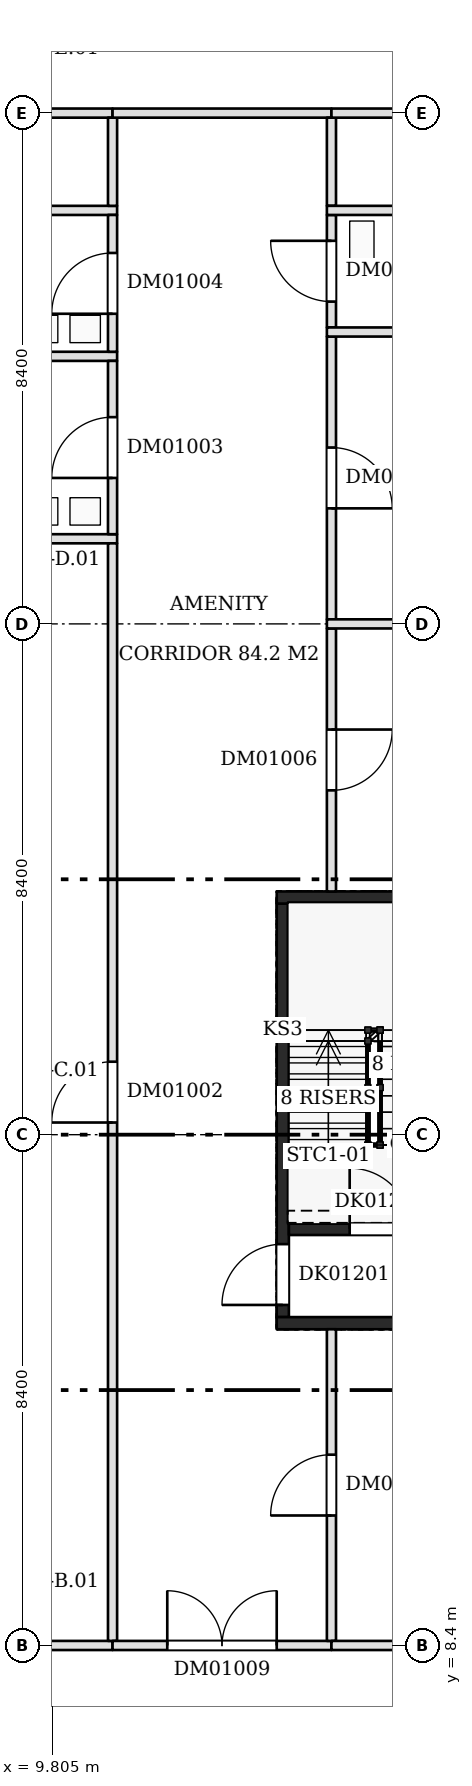
"""IFC4 building model, lengths in metres.
Left out: names, types, materials, properties, quantities, classifications, styles, units other than length and angle.
Written with IfcOpenShell. Run it as: python <this file> out.ifc"""

import sys

from ifc_helpers import new_model, si_unit, direction, frame, frame_2d, origin, place, context, subcontext, project, spatial, rectangle, extrude, element, fill, save


model = new_model("IFC4")
c1 = context("Model", 3, precision=1e-05, world=origin(), true_north=direction((0.0, 1.0)))
c2 = subcontext(c1, "Body", "Model", "MODEL_VIEW")
j1 = project(units=[si_unit("LENGTHUNIT", "METRE"), si_unit("PLANEANGLEUNIT", "RADIAN")], contexts=[c1])
p1 = place(None, origin())
s1 = spatial("IfcSite", under=j1, at=p1, CompositionType="ELEMENT")
p2 = place(p1, origin())
s2 = spatial("IfcBuilding", under=s1, at=p2, CompositionType="ELEMENT")
p3 = place(p2, frame((0.0, 0.0, 9.0)))
s3 = spatial("IfcBuildingStorey", under=s2, at=p3, CompositionType="ELEMENT", Elevation=9.0)
p4 = place(p3, frame((13.6, 13.8, 0.0), z_axis=(0.0, 0.0, 1.0), x_axis=(0.0, 1.0, 0.0)))
e1 = element("IfcWall", 1, at=p4, inside=s3, PredefinedType="SHEAR", context=c2, shape_type="SweptSolid", body=[
    extrude(rectangle(XDim=6.8, YDim=0.2, at=frame_2d((3.4, 0.0))), origin(), (0.0, 0.0, 1.0), 4.98),
])
p5 = place(p4, frame((0.2, 0.0, 0.0)))
e2 = element("IfcOpeningElement", 2, at=p5, cuts=e1, PredefinedType="OPENING", context=c2, shape_type="SweptSolid", body=[
    extrude(rectangle(XDim=1.0, YDim=2.1, at=frame_2d((0.5, 1.05))), frame((0.0, 0.11, 0.0), z_axis=(0.0, -1.0, 0.0), x_axis=(1.0, 0.0, 0.0)), (0.0, 0.0, 1.0), 0.22),
])
for number, where, z_axis, x_axis in (
    (3, (13.5, 13.7, 0.0), (0.0, 0.0, 1.0), (1.0, 0.0, 0.0)),
    (4, (13.5, 20.7, 0.0), (0.0, 0.0, 1.0), (1.0, 0.0, 0.0)),
):
    element("IfcWall", number, at=place(p3, frame(where, z_axis=z_axis, x_axis=x_axis)), inside=s3, PredefinedType="SHEAR", context=c2, shape_type="SweptSolid", body=[
        extrude(rectangle(XDim=3.4, YDim=0.2, at=frame_2d((1.7, 0.0))), origin(), (0.0, 0.0, 1.0), 4.98),
    ])
p6 = place(p3, frame((13.7, 15.25, 0.0), z_axis=(0.0, 0.0, 1.0), x_axis=(1.0, 0.0, 0.0)))
e5 = element("IfcWall", 5, at=p6, inside=s3, PredefinedType="SHEAR", context=c2, shape_type="SweptSolid", body=[
    extrude(rectangle(XDim=3.0, YDim=0.2, at=frame_2d((1.5, 0.0))), origin(), (0.0, 0.0, 1.0), 4.98),
])
p7 = place(p6, frame((1.0, 0.0, 0.0)))
e6 = element("IfcOpeningElement", 6, at=p7, cuts=e5, PredefinedType="OPENING", context=c2, shape_type="SweptSolid", body=[
    extrude(rectangle(XDim=1.0, YDim=2.1, at=frame_2d((0.5, 1.05))), frame((0.0, 0.11, 0.0), z_axis=(0.0, -1.0, 0.0), x_axis=(1.0, 0.0, 0.0)), (0.0, 0.0, 1.0), 0.22),
])
for number, where, z_axis, x_axis in (
    (7, (2.5, 29.6, 0.0), (0.0, 0.0, 1.0), (1.0, 0.0, 0.0)),
    (8, (2.5, 32.0, 0.0), (0.0, 0.0, 1.0), (1.0, 0.0, 0.0)),
):
    element("IfcWall", number, at=place(p3, frame(where, z_axis=z_axis, x_axis=x_axis)), inside=s3, PredefinedType="PARTITIONING", context=c2, shape_type="SweptSolid", body=[
        extrude(rectangle(XDim=8.375, YDim=0.15, at=frame_2d((4.188, 0.0))), origin(), (0.0, 0.0, 1.0), 4.95),
    ])
p8 = place(p3, frame((9.15, 8.4, 0.0), z_axis=(0.0, 0.0, 1.0), x_axis=(1.0, 0.0, 0.0)))
e9 = element("IfcWall", 9, at=p8, inside=s3, PredefinedType="PARTITIONING", context=c2, shape_type="SweptSolid", body=[
    extrude(rectangle(XDim=1.65, YDim=0.15, at=frame_2d((0.825, 0.0))), origin(), (0.0, 0.0, 1.0), 4.95),
])
p9 = place(p3, frame((8.4, 26.6, 0.0), z_axis=(0.0, 0.0, 1.0), x_axis=(1.0, 0.0, 0.0)))
e10 = element("IfcWall", 10, at=p9, inside=s3, PredefinedType="PARTITIONING", context=c2, shape_type="SweptSolid", body=[
    extrude(rectangle(XDim=2.475, YDim=0.15, at=frame_2d((1.238, 0.0))), origin(), (0.0, 0.0, 1.0), 4.95),
])
p10 = place(p3, frame((9.15, 33.6, 0.0), z_axis=(0.0, 0.0, 1.0), x_axis=(1.0, 0.0, 0.0)))
e11 = element("IfcWall", 11, at=p10, inside=s3, PredefinedType="PARTITIONING", context=c2, shape_type="SweptSolid", body=[
    extrude(rectangle(XDim=1.65, YDim=0.15, at=frame_2d((0.825, 0.0))), origin(), (0.0, 0.0, 1.0), 4.95),
])
p11 = place(p3, frame((10.8, 8.475, 0.0), z_axis=(0.0, 0.0, 1.0), x_axis=(0.0, 1.0, 0.0)))
e12 = element("IfcWall", 12, at=p11, inside=s3, PredefinedType="PARTITIONING", context=c2, shape_type="SweptSolid", body=[
    extrude(rectangle(XDim=18.05, YDim=0.15, at=frame_2d((9.025, 0.0))), origin(), (0.0, 0.0, 1.0), 4.95),
])
p12 = place(p11, frame((8.525, 0.0, 0.0)))
e13 = element("IfcOpeningElement", 13, at=p12, cuts=e12, PredefinedType="OPENING", context=c2, shape_type="SweptSolid", body=[
    extrude(rectangle(XDim=1.0, YDim=2.1, at=frame_2d((0.5, 1.05))), frame((0.0, 0.085, 0.0), z_axis=(0.0, -1.0, 0.0), x_axis=(1.0, 0.0, 0.0)), (0.0, 0.0, 1.0), 0.17),
])
p13 = place(p3, frame((10.8, 8.4, 0.0), z_axis=(0.0, 0.0, 1.0), x_axis=(1.0, 0.0, 0.0)))
e14 = element("IfcWall", 14, at=p13, inside=s3, PredefinedType="PARTITIONING", context=c2, shape_type="SweptSolid", body=[
    extrude(rectangle(XDim=3.6, YDim=0.15, at=frame_2d((1.8, 0.0))), origin(), (0.0, 0.0, 1.0), 4.95),
])
p14 = place(p13, frame((0.9, 0.0, 0.0)))
e15 = element("IfcOpeningElement", 15, at=p14, cuts=e14, PredefinedType="OPENING", context=c2, shape_type="SweptSolid", body=[
    extrude(rectangle(XDim=1.8, YDim=2.1, at=frame_2d((0.9, 1.05))), frame((0.0, 0.085, 0.0), z_axis=(0.0, -1.0, 0.0), x_axis=(1.0, 0.0, 0.0)), (0.0, 0.0, 1.0), 0.17),
])
p15 = place(p3, frame((10.8, 26.675, 0.0), z_axis=(0.0, 0.0, 1.0), x_axis=(0.0, 1.0, 0.0)))
e16 = element("IfcWall", 16, at=p15, inside=s3, PredefinedType="PARTITIONING", context=c2, shape_type="SweptSolid", body=[
    extrude(rectangle(XDim=2.85, YDim=0.15, at=frame_2d((1.425, 0.0))), origin(), (0.0, 0.0, 1.0), 4.95),
])
p16 = place(p15, frame((0.925, 0.0, 0.0)))
e17 = element("IfcOpeningElement", 17, at=p16, cuts=e16, PredefinedType="OPENING", context=c2, shape_type="SweptSolid", body=[
    extrude(rectangle(XDim=1.0, YDim=2.1, at=frame_2d((0.5, 1.05))), frame((0.0, 0.085, 0.0), z_axis=(0.0, -1.0, 0.0), x_axis=(1.0, 0.0, 0.0)), (0.0, 0.0, 1.0), 0.17),
])
p17 = place(p3, frame((10.8, 29.675, 0.0), z_axis=(0.0, 0.0, 1.0), x_axis=(0.0, 1.0, 0.0)))
e18 = element("IfcWall", 18, at=p17, inside=s3, PredefinedType="PARTITIONING", context=c2, shape_type="SweptSolid", body=[
    extrude(rectangle(XDim=2.25, YDim=0.15, at=frame_2d((1.125, 0.0))), origin(), (0.0, 0.0, 1.0), 4.95),
])
p18 = place(p17, frame((0.625, 0.0, 0.0)))
e19 = element("IfcOpeningElement", 19, at=p18, cuts=e18, PredefinedType="OPENING", context=c2, shape_type="SweptSolid", body=[
    extrude(rectangle(XDim=1.0, YDim=2.1, at=frame_2d((0.5, 1.05))), frame((0.0, 0.085, 0.0), z_axis=(0.0, -1.0, 0.0), x_axis=(1.0, 0.0, 0.0)), (0.0, 0.0, 1.0), 0.17),
])
p19 = place(p3, frame((10.8, 32.075, 0.0), z_axis=(0.0, 0.0, 1.0), x_axis=(0.0, 1.0, 0.0)))
e20 = element("IfcWall", 20, at=p19, inside=s3, PredefinedType="PARTITIONING", context=c2, shape_type="SweptSolid", body=[
    extrude(rectangle(XDim=1.45, YDim=0.15, at=frame_2d((0.725, 0.0))), origin(), (0.0, 0.0, 1.0), 4.95),
])
p20 = place(p3, frame((10.8, 33.6, 0.0), z_axis=(0.0, 0.0, 1.0), x_axis=(1.0, 0.0, 0.0)))
e21 = element("IfcWall", 21, at=p20, inside=s3, PredefinedType="PARTITIONING", context=c2, shape_type="SweptSolid", body=[
    extrude(rectangle(XDim=3.6, YDim=0.15, at=frame_2d((1.8, 0.0))), origin(), (0.0, 0.0, 1.0), 4.95),
])
p21 = place(p3, frame((14.4, 8.475, 0.0), z_axis=(0.0, 0.0, 1.0), x_axis=(0.0, 1.0, 0.0)))
e22 = element("IfcWall", 22, at=p21, inside=s3, PredefinedType="PARTITIONING", context=c2, shape_type="SweptSolid", body=[
    extrude(rectangle(XDim=5.125, YDim=0.15, at=frame_2d((2.562, 0.0))), origin(), (0.0, 0.0, 1.0), 4.95),
])
p22 = place(p21, frame((2.062, 0.0, 0.0)))
e23 = element("IfcOpeningElement", 23, at=p22, cuts=e22, PredefinedType="OPENING", context=c2, shape_type="SweptSolid", body=[
    extrude(rectangle(XDim=1.0, YDim=2.1, at=frame_2d((0.5, 1.05))), frame((0.0, 0.085, 0.0), z_axis=(0.0, -1.0, 0.0), x_axis=(1.0, 0.0, 0.0)), (0.0, 0.0, 1.0), 0.17),
])
p23 = place(p3, frame((14.4, 8.4, 0.0), z_axis=(0.0, 0.0, 1.0), x_axis=(1.0, 0.0, 0.0)))
e24 = element("IfcWall", 24, at=p23, inside=s3, PredefinedType="PARTITIONING", context=c2, shape_type="SweptSolid", body=[
    extrude(rectangle(XDim=1.65, YDim=0.15, at=frame_2d((0.825, 0.0))), origin(), (0.0, 0.0, 1.0), 4.95),
])
p24 = place(p3, frame((14.4, 20.8, 0.0), z_axis=(0.0, 0.0, 1.0), x_axis=(0.0, 1.0, 0.0)))
e25 = element("IfcWall", 25, at=p24, inside=s3, PredefinedType="PARTITIONING", context=c2, shape_type="SweptSolid", body=[
    extrude(rectangle(XDim=4.325, YDim=0.15, at=frame_2d((2.163, 0.0))), origin(), (0.0, 0.0, 1.0), 4.95),
])
p25 = place(p24, frame((1.663, 0.0, 0.0)))
e26 = element("IfcOpeningElement", 26, at=p25, cuts=e25, PredefinedType="OPENING", context=c2, shape_type="SweptSolid", body=[
    extrude(rectangle(XDim=1.0, YDim=2.1, at=frame_2d((0.5, 1.05))), frame((0.0, 0.085, 0.0), z_axis=(0.0, -1.0, 0.0), x_axis=(1.0, 0.0, 0.0)), (0.0, 0.0, 1.0), 0.17),
])
p26 = place(p3, frame((14.4, 25.275, 0.0), z_axis=(0.0, 0.0, 1.0), x_axis=(0.0, 1.0, 0.0)))
e27 = element("IfcWall", 27, at=p26, inside=s3, PredefinedType="PARTITIONING", context=c2, shape_type="SweptSolid", body=[
    extrude(rectangle(XDim=4.65, YDim=0.15, at=frame_2d((2.325, 0.0))), origin(), (0.0, 0.0, 1.0), 4.95),
])
p27 = place(p26, frame((1.825, 0.0, 0.0)))
e28 = element("IfcOpeningElement", 28, at=p27, cuts=e27, PredefinedType="OPENING", context=c2, shape_type="SweptSolid", body=[
    extrude(rectangle(XDim=1.0, YDim=2.1, at=frame_2d((0.5, 1.05))), frame((0.0, 0.085, 0.0), z_axis=(0.0, -1.0, 0.0), x_axis=(1.0, 0.0, 0.0)), (0.0, 0.0, 1.0), 0.17),
])
p28 = place(p3, frame((14.325, 25.2, 0.0), z_axis=(0.0, 0.0, 1.0), x_axis=(1.0, 0.0, 0.0)))
e29 = element("IfcWall", 29, at=p28, inside=s3, PredefinedType="PARTITIONING", context=c2, shape_type="SweptSolid", body=[
    extrude(rectangle(XDim=1.725, YDim=0.15, at=frame_2d((0.863, 0.0))), origin(), (0.0, 0.0, 1.0), 4.95),
])
p29 = place(p3, frame((14.4, 30.075, 0.0), z_axis=(0.0, 0.0, 1.0), x_axis=(0.0, 1.0, 0.0)))
e30 = element("IfcWall", 30, at=p29, inside=s3, PredefinedType="PARTITIONING", context=c2, shape_type="SweptSolid", body=[
    extrude(rectangle(XDim=1.85, YDim=0.15, at=frame_2d((0.925, 0.0))), origin(), (0.0, 0.0, 1.0), 4.95),
])
p30 = place(p29, frame((0.425, 0.0, 0.0)))
e31 = element("IfcOpeningElement", 31, at=p30, cuts=e30, PredefinedType="OPENING", context=c2, shape_type="SweptSolid", body=[
    extrude(rectangle(XDim=1.0, YDim=2.1, at=frame_2d((0.5, 1.05))), frame((0.0, 0.085, 0.0), z_axis=(0.0, -1.0, 0.0), x_axis=(1.0, 0.0, 0.0)), (0.0, 0.0, 1.0), 0.17),
])
p31 = place(p3, frame((14.325, 30.0, 0.0), z_axis=(0.0, 0.0, 1.0), x_axis=(1.0, 0.0, 0.0)))
e32 = element("IfcWall", 32, at=p31, inside=s3, PredefinedType="PARTITIONING", context=c2, shape_type="SweptSolid", body=[
    extrude(rectangle(XDim=3.75, YDim=0.15, at=frame_2d((1.875, 0.0))), origin(), (0.0, 0.0, 1.0), 4.95),
])
p32 = place(p3, frame((14.4, 32.075, 0.0), z_axis=(0.0, 0.0, 1.0), x_axis=(0.0, 1.0, 0.0)))
e33 = element("IfcWall", 33, at=p32, inside=s3, PredefinedType="PARTITIONING", context=c2, shape_type="SweptSolid", body=[
    extrude(rectangle(XDim=1.45, YDim=0.15, at=frame_2d((0.725, 0.0))), origin(), (0.0, 0.0, 1.0), 4.95),
])
p33 = place(p3, frame((14.325, 32.0, 0.0), z_axis=(0.0, 0.0, 1.0), x_axis=(1.0, 0.0, 0.0)))
e34 = element("IfcWall", 34, at=p33, inside=s3, PredefinedType="PARTITIONING", context=c2, shape_type="SweptSolid", body=[
    extrude(rectangle(XDim=3.75, YDim=0.15, at=frame_2d((1.875, 0.0))), origin(), (0.0, 0.0, 1.0), 4.95),
])
p34 = place(p3, frame((14.4, 33.6, 0.0), z_axis=(0.0, 0.0, 1.0), x_axis=(1.0, 0.0, 0.0)))
e35 = element("IfcWall", 35, at=p34, inside=s3, PredefinedType="PARTITIONING", context=c2, shape_type="SweptSolid", body=[
    extrude(rectangle(XDim=1.65, YDim=0.15, at=frame_2d((0.825, 0.0))), origin(), (0.0, 0.0, 1.0), 4.95),
])
p35 = place(p5, origin())
e36 = element("IfcDoor", 36, at=p35, inside=s3, OperationType="SINGLE_SWING_LEFT", PredefinedType="DOOR", context=c2, shape_type="SweptSolid", body=[
    extrude(rectangle(XDim=1.0, YDim=2.1, at=frame_2d((0.5, 1.05))), frame((0.0, 0.025, 0.0), z_axis=(0.0, -1.0, 0.0), x_axis=(1.0, 0.0, 0.0)), (0.0, 0.0, 1.0), 0.05),
])
fill(e2, e36)
p36 = place(p7, origin())
e37 = element("IfcDoor", 37, at=p36, inside=s3, OperationType="SINGLE_SWING_LEFT", PredefinedType="DOOR", context=c2, shape_type="SweptSolid", body=[
    extrude(rectangle(XDim=1.0, YDim=2.1, at=frame_2d((0.5, 1.05))), frame((0.0, 0.025, 0.0), z_axis=(0.0, -1.0, 0.0), x_axis=(1.0, 0.0, 0.0)), (0.0, 0.0, 1.0), 0.05),
])
fill(e6, e37)
p37 = place(p12, origin())
e38 = element("IfcDoor", 38, at=p37, inside=s3, OperationType="SINGLE_SWING_LEFT", PredefinedType="DOOR", context=c2, shape_type="SweptSolid", body=[
    extrude(rectangle(XDim=1.0, YDim=2.1, at=frame_2d((0.5, 1.05))), frame((0.0, 0.025, 0.0), z_axis=(0.0, -1.0, 0.0), x_axis=(1.0, 0.0, 0.0)), (0.0, 0.0, 1.0), 0.05),
])
fill(e13, e38)
p38 = place(p16, origin())
e39 = element("IfcDoor", 39, at=p38, inside=s3, OperationType="SINGLE_SWING_LEFT", PredefinedType="DOOR", context=c2, shape_type="SweptSolid", body=[
    extrude(rectangle(XDim=1.0, YDim=2.1, at=frame_2d((0.5, 1.05))), frame((0.0, 0.025, 0.0), z_axis=(0.0, -1.0, 0.0), x_axis=(1.0, 0.0, 0.0)), (0.0, 0.0, 1.0), 0.05),
])
fill(e17, e39)
p39 = place(p18, origin())
e40 = element("IfcDoor", 40, at=p39, inside=s3, OperationType="SINGLE_SWING_LEFT", PredefinedType="DOOR", context=c2, shape_type="SweptSolid", body=[
    extrude(rectangle(XDim=1.0, YDim=2.1, at=frame_2d((0.5, 1.05))), frame((0.0, 0.025, 0.0), z_axis=(0.0, -1.0, 0.0), x_axis=(1.0, 0.0, 0.0)), (0.0, 0.0, 1.0), 0.05),
])
fill(e19, e40)
p40 = place(p22, origin())
e41 = element("IfcDoor", 41, at=p40, inside=s3, OperationType="SINGLE_SWING_LEFT", PredefinedType="DOOR", context=c2, shape_type="SweptSolid", body=[
    extrude(rectangle(XDim=1.0, YDim=2.1, at=frame_2d((0.5, 1.05))), frame((0.0, 0.025, 0.0), z_axis=(0.0, -1.0, 0.0), x_axis=(1.0, 0.0, 0.0)), (0.0, 0.0, 1.0), 0.05),
])
fill(e23, e41)
p41 = place(p25, frame((1.0, 0.0, 0.0), z_axis=(0.0, 0.0, 1.0), x_axis=(-1.0, 0.0, 0.0)))
e42 = element("IfcDoor", 42, at=p41, inside=s3, OperationType="SINGLE_SWING_LEFT", PredefinedType="DOOR", context=c2, shape_type="SweptSolid", body=[
    extrude(rectangle(XDim=1.0, YDim=2.1, at=frame_2d((0.5, 1.05))), frame((0.0, 0.025, 0.0), z_axis=(0.0, -1.0, 0.0), x_axis=(1.0, 0.0, 0.0)), (0.0, 0.0, 1.0), 0.05),
])
fill(e26, e42)
p42 = place(p30, origin())
e43 = element("IfcDoor", 43, at=p42, inside=s3, OperationType="SINGLE_SWING_RIGHT", PredefinedType="DOOR", context=c2, shape_type="SweptSolid", body=[
    extrude(rectangle(XDim=1.0, YDim=2.1, at=frame_2d((0.5, 1.05))), frame((0.0, 0.025, 0.0), z_axis=(0.0, -1.0, 0.0), x_axis=(1.0, 0.0, 0.0)), (0.0, 0.0, 1.0), 0.05),
])
fill(e31, e43)
p43 = place(p27, frame((1.0, 0.0, 0.0), z_axis=(0.0, 0.0, 1.0), x_axis=(-1.0, 0.0, 0.0)))
e44 = element("IfcDoor", 44, at=p43, inside=s3, OperationType="SINGLE_SWING_RIGHT", PredefinedType="DOOR", context=c2, shape_type="SweptSolid", body=[
    extrude(rectangle(XDim=1.0, YDim=2.1, at=frame_2d((0.5, 1.05))), frame((0.0, 0.025, 0.0), z_axis=(0.0, -1.0, 0.0), x_axis=(1.0, 0.0, 0.0)), (0.0, 0.0, 1.0), 0.05),
])
fill(e28, e44)
p44 = place(p14, origin())
e45 = element("IfcDoor", 45, at=p44, inside=s3, OperationType="DOUBLE_DOOR_SINGLE_SWING", PredefinedType="DOOR", context=c2, shape_type="SweptSolid", body=[
    extrude(rectangle(XDim=1.8, YDim=2.1, at=frame_2d((0.9, 1.05))), frame((0.0, 0.025, 0.0), z_axis=(0.0, -1.0, 0.0), x_axis=(1.0, 0.0, 0.0)), (0.0, 0.0, 1.0), 0.05),
])
fill(e15, e45)
save(model, sys.argv[1])
